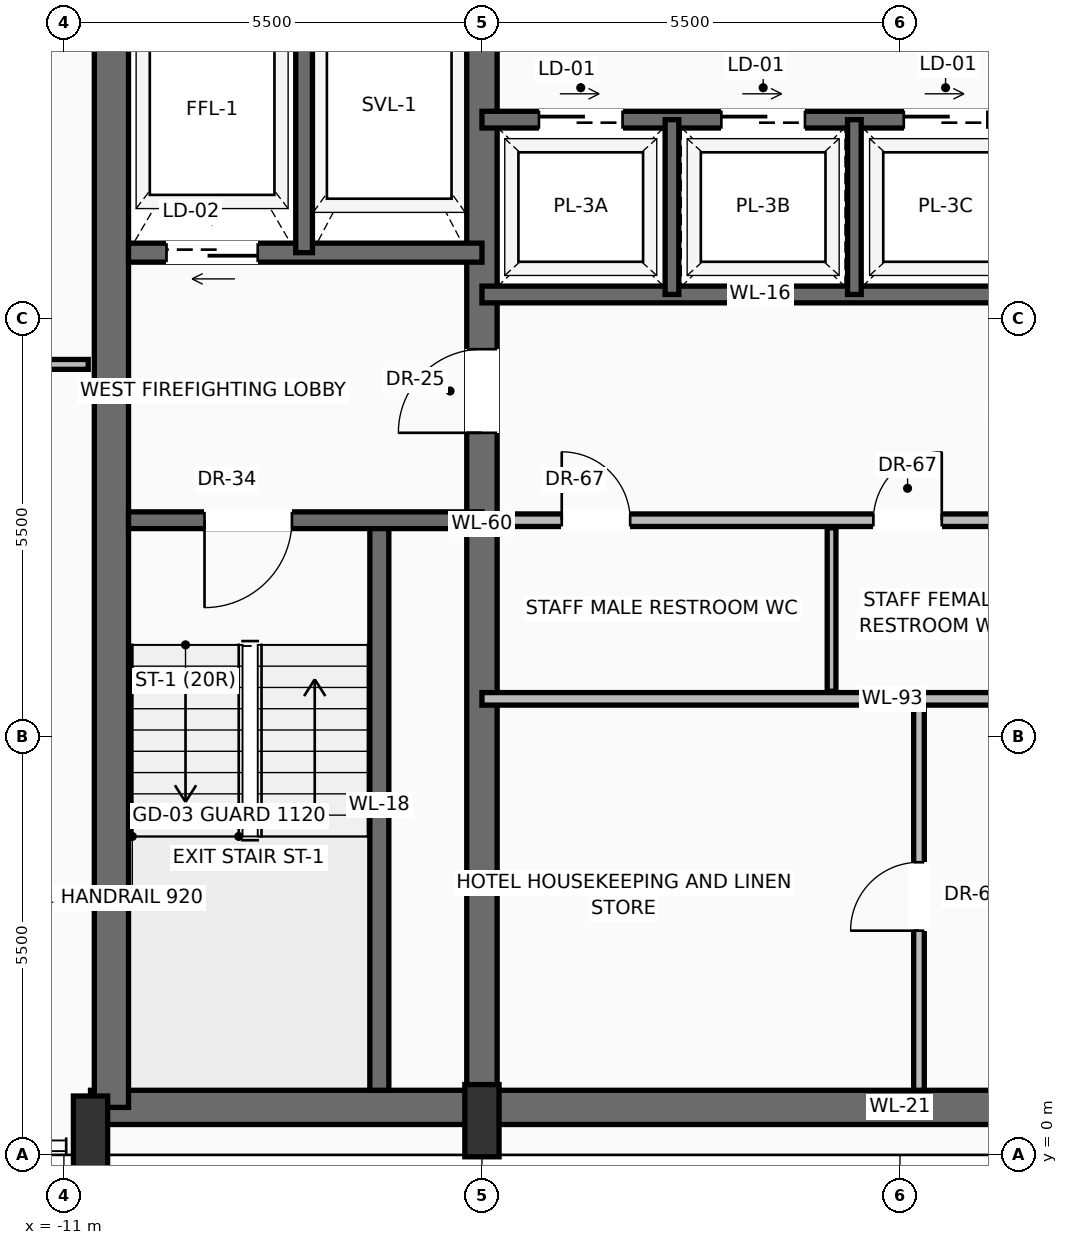
"""IFC4 building model, lengths in metres.
Left out: names, types, materials, properties, quantities, classifications, styles, units other than length and angle.
Written with IfcOpenShell. Run it as: python <this file> out.ifc"""

import sys

from ifc_helpers import new_model, si_unit, direction, frame, frame_2d, origin, origin_2d, place, context, subcontext, project, spatial, rectangle, extrude, source, transform, mapped, element, fill, save


model = new_model("IFC4")
c1 = context("Model", 3, precision=1e-05, world=origin(), true_north=direction((0.0, 1.0)))
c2 = subcontext(c1, "Body", "Model", "MODEL_VIEW")
j1 = project(units=[si_unit("LENGTHUNIT", "METRE"), si_unit("PLANEANGLEUNIT", "RADIAN")], contexts=[c1])
p1 = place(None, origin())
s1 = spatial("IfcSite", under=j1, at=p1, CompositionType="ELEMENT")
p2 = place(p1, origin())
s2 = spatial("IfcBuilding", under=s1, at=p2, CompositionType="ELEMENT")
p3 = place(p2, frame((0.0, 0.0, 273.0)))
s3 = spatial("IfcBuildingStorey", under=s2, at=p3, CompositionType="ELEMENT", Elevation=273.0)
p4 = place(p3, frame((-10.65, 0.625, 0.0), z_axis=(0.0, 0.0, 1.0), x_axis=(1.0, 0.0, 0.0)))
e1 = element("IfcWall", 1, at=p4, inside=s3, PredefinedType="SHEAR", context=c2, shape_type="SweptSolid", body=[
    extrude(rectangle(XDim=21.3, YDim=0.45, at=frame_2d((10.65, 0.0))), origin(), (0.0, 0.0, 1.0), 3.24),
])
p5 = place(p3, frame((-10.375, 0.625, 0.0), z_axis=(0.0, 0.0, 1.0), x_axis=(0.0, 1.0, 0.0)))
e2 = element("IfcWall", 2, at=p5, inside=s3, PredefinedType="SHEAR", context=c2, shape_type="SweptSolid", body=[
    extrude(rectangle(XDim=15.35, YDim=0.45, at=frame_2d((7.675, 0.0))), origin(), (0.0, 0.0, 1.0), 3.24),
])
p6 = place(p3, frame((-5.5, 0.625, 0.0), z_axis=(0.0, 0.0, 1.0), x_axis=(0.0, 1.0, 0.0)))
e3 = element("IfcWall", 3, at=p6, inside=s3, PredefinedType="SHEAR", context=c2, shape_type="SweptSolid", body=[
    extrude(rectangle(XDim=15.35, YDim=0.4, at=frame_2d((7.675, 0.0))), origin(), (0.0, 0.0, 1.0), 3.24),
])
p7 = place(p6, frame((8.875, 0.0, 0.0)))
e4 = element("IfcOpeningElement", 4, at=p7, cuts=e3, PredefinedType="OPENING", context=c2, shape_type="SweptSolid", body=[
    extrude(rectangle(XDim=1.1, YDim=2.2, at=frame_2d((0.55, 1.1))), frame((0.0, 0.21, 0.0), z_axis=(0.0, -1.0, 0.0), x_axis=(1.0, 0.0, 0.0)), (0.0, 0.0, 1.0), 0.42),
])
m1 = source(origin(), c2, "Body", "SweptSolid", [
    extrude(rectangle(XDim=0.45, YDim=0.95, at=origin_2d()), origin(), (0.0, 0.0, 1.0), 3.45),
])
for number, where, z_axis, x_axis in (
    (5, (-10.65, 0.3, 0.0), (0.0, 0.0, 1.0), (1.0, 0.0, 0.0)),
    (6, (-5.5, 0.45, 0.0), (0.0, 0.0, 1.0), (1.0, 0.0, 0.0)),
):
    element("IfcColumn", number, at=place(p3, frame(where, z_axis=z_axis, x_axis=x_axis)), inside=s3, PredefinedType="PILASTER", context=c2, shape_type="MappedRepresentation", body=[
        mapped(m1, transform((0.0, 0.0, 0.0), scale=1.0)),
    ])
p8 = place(p3, frame((-18.529, 14.308, 0.0), z_axis=(0.0, 0.0, 1.0), x_axis=(0.500615740451, 0.86566961389, 0.0)))
e7 = element("IfcWall", 7, at=p8, inside=s3, PredefinedType="SOLIDWALL", context=c2, shape_type="SweptSolid", body=[
    extrude(rectangle(XDim=20.05, YDim=0.28, at=frame_2d((10.025, 0.0))), origin(), (0.0, 0.0, 1.0), 2.82),
])
p9 = place(p8, frame((4.812, 0.0, 0.0)))
e8 = element("IfcOpeningElement", 8, at=p9, cuts=e7, PredefinedType="OPENING", context=c2, shape_type="SweptSolid", body=[
    extrude(rectangle(XDim=1.6, YDim=2.35, at=frame_2d((0.8, 1.175))), frame((0.0, 0.15, 0.0), z_axis=(0.0, -1.0, 0.0), x_axis=(1.0, 0.0, 0.0)), (0.0, 0.0, 1.0), 0.3),
])
p10 = place(p8, frame((13.634, 0.0, 0.9)))
e9 = element("IfcOpeningElement", 9, at=p10, cuts=e7, PredefinedType="OPENING", context=c2, shape_type="SweptSolid", body=[
    extrude(rectangle(XDim=1.55, YDim=1.75, at=frame_2d((0.775, 0.875))), frame((0.0, 0.15, 0.0), z_axis=(0.0, -1.0, 0.0), x_axis=(1.0, 0.0, 0.0)), (0.0, 0.0, 1.0), 0.3),
])
p11 = place(p3, frame((-6.85, 0.85, 0.0), z_axis=(0.0, 0.0, 1.0), x_axis=(0.0, 1.0, 0.0)))
e10 = element("IfcWall", 10, at=p11, inside=s3, PredefinedType="SOLIDWALL", context=c2, shape_type="SweptSolid", body=[
    extrude(rectangle(XDim=7.5, YDim=0.25, at=frame_2d((3.75, 0.0))), origin(), (0.0, 0.0, 1.0), 3.24),
])
p12 = place(p3, frame((-5.5, 8.35, 0.0), z_axis=(0.0, 0.0, 1.0), x_axis=(-1.0, 0.0, 0.0)))
e11 = element("IfcWall", 11, at=p12, inside=s3, PredefinedType="SOLIDWALL", context=c2, shape_type="SweptSolid", body=[
    extrude(rectangle(XDim=4.65, YDim=0.22, at=frame_2d((2.325, 0.0))), origin(), (0.0, 0.0, 1.0), 3.24),
])
p13 = place(p12, frame((2.5, 0.0, 0.0)))
e12 = element("IfcOpeningElement", 12, at=p13, cuts=e11, PredefinedType="OPENING", context=c2, shape_type="SweptSolid", body=[
    extrude(rectangle(XDim=1.15, YDim=2.2, at=frame_2d((0.575, 1.1))), frame((0.0, 0.12, 0.0), z_axis=(0.0, -1.0, 0.0), x_axis=(1.0, 0.0, 0.0)), (0.0, 0.0, 1.0), 0.24),
])
p14 = place(p3, frame((-5.5, 11.87, 0.0), z_axis=(0.0, 0.0, 1.0), x_axis=(-1.0, 0.0, 0.0)))
e13 = element("IfcWall", 13, at=p14, inside=s3, PredefinedType="SOLIDWALL", context=c2, shape_type="SweptSolid", body=[
    extrude(rectangle(XDim=4.65, YDim=0.25, at=frame_2d((2.325, 0.0))), origin(), (0.0, 0.0, 1.0), 3.24),
])
p15 = place(p14, frame((2.95, 0.0, 0.0)))
e14 = element("IfcOpeningElement", 14, at=p15, cuts=e13, PredefinedType="OPENING", context=c2, shape_type="SweptSolid", body=[
    extrude(rectangle(XDim=1.2, YDim=2.25, at=frame_2d((0.6, 1.125))), frame((0.0, 0.135, 0.0), z_axis=(0.0, -1.0, 0.0), x_axis=(1.0, 0.0, 0.0)), (0.0, 0.0, 1.0), 0.27),
])
p16 = place(p3, frame((-7.84, 11.87, 0.0), z_axis=(0.0, 0.0, 1.0), x_axis=(0.0, 1.0, 0.0)))
e15 = element("IfcWall", 15, at=p16, inside=s3, PredefinedType="SOLIDWALL", context=c2, shape_type="SweptSolid", body=[
    extrude(rectangle(XDim=3.88, YDim=0.22, at=frame_2d((1.94, 0.0))), origin(), (0.0, 0.0, 1.0), 3.24),
])
p17 = place(p3, frame((-5.5, 6.0, 0.0), z_axis=(0.0, 0.0, 1.0), x_axis=(1.0, 0.0, 0.0)))
e16 = element("IfcWall", 16, at=p17, inside=s3, PredefinedType="PARTITIONING", context=c2, shape_type="SweptSolid", body=[
    extrude(rectangle(XDim=10.8, YDim=0.165, at=frame_2d((5.4, 0.0))), origin(), (0.0, 0.0, 1.0), 3.232),
])
p18 = place(p17, frame((7.7, 0.0, 0.0)))
e17 = element("IfcOpeningElement", 17, at=p18, cuts=e16, PredefinedType="OPENING", context=c2, shape_type="SweptSolid", body=[
    extrude(rectangle(XDim=0.9, YDim=2.1, at=frame_2d((0.45, 1.05))), frame((0.0, 0.093, 0.0), z_axis=(0.0, -1.0, 0.0), x_axis=(1.0, 0.0, 0.0)), (0.0, 0.0, 1.0), 0.185),
])
p19 = place(p3, frame((0.25, 0.85, 0.0), z_axis=(0.0, 0.0, 1.0), x_axis=(0.0, 1.0, 0.0)))
e18 = element("IfcWall", 18, at=p19, inside=s3, PredefinedType="PARTITIONING", context=c2, shape_type="SweptSolid", body=[
    extrude(rectangle(XDim=5.03, YDim=0.14, at=frame_2d((2.515, 0.0))), origin(), (0.0, 0.0, 1.0), 3.232),
])
p20 = place(p19, frame((2.1, 0.0, 0.0)))
e19 = element("IfcOpeningElement", 19, at=p20, cuts=e18, PredefinedType="OPENING", context=c2, shape_type="SweptSolid", body=[
    extrude(rectangle(XDim=0.9, YDim=2.1, at=frame_2d((0.45, 1.05))), frame((0.0, 0.08, 0.0), z_axis=(0.0, -1.0, 0.0), x_axis=(1.0, 0.0, 0.0)), (0.0, 0.0, 1.0), 0.16),
])
p21 = place(p3, frame((-5.3, 8.35, 0.0), z_axis=(0.0, 0.0, 1.0), x_axis=(1.0, 0.0, 0.0)))
e20 = element("IfcWall", 20, at=p21, inside=s3, PredefinedType="PARTITIONING", context=c2, shape_type="SweptSolid", body=[
    extrude(rectangle(XDim=7.12, YDim=0.165, at=frame_2d((3.56, 0.0))), origin(), (0.0, 0.0, 1.0), 3.232),
])
p22 = place(p21, frame((0.85, 0.0, 0.0)))
e21 = element("IfcOpeningElement", 21, at=p22, cuts=e20, PredefinedType="OPENING", context=c2, shape_type="SweptSolid", body=[
    extrude(rectangle(XDim=0.9, YDim=2.1, at=frame_2d((0.45, 1.05))), frame((0.0, 0.093, 0.0), z_axis=(0.0, -1.0, 0.0), x_axis=(1.0, 0.0, 0.0)), (0.0, 0.0, 1.0), 0.185),
])
p23 = place(p21, frame((4.95, 0.0, 0.0)))
e22 = element("IfcOpeningElement", 22, at=p23, cuts=e20, PredefinedType="OPENING", context=c2, shape_type="SweptSolid", body=[
    extrude(rectangle(XDim=0.9, YDim=2.1, at=frame_2d((0.45, 1.05))), frame((0.0, 0.093, 0.0), z_axis=(0.0, -1.0, 0.0), x_axis=(1.0, 0.0, 0.0)), (0.0, 0.0, 1.0), 0.185),
])
p24 = place(p3, frame((-0.9, 6.1, 0.0), z_axis=(0.0, 0.0, 1.0), x_axis=(0.0, 1.0, 0.0)))
e23 = element("IfcWall", 23, at=p24, inside=s3, PredefinedType="PARTITIONING", context=c2, shape_type="SweptSolid", body=[
    extrude(rectangle(XDim=2.15, YDim=0.115, at=frame_2d((1.075, 0.0))), origin(), (0.0, 0.0, 1.0), 3.232),
])
p25 = place(p3, frame((-5.5, 11.32, 0.0), z_axis=(0.0, 0.0, 1.0), x_axis=(1.0, 0.0, 0.0)))
e24 = element("IfcWall", 24, at=p25, inside=s3, PredefinedType="SOLIDWALL", context=c2, shape_type="SweptSolid", body=[
    extrude(rectangle(XDim=7.32, YDim=0.22, at=frame_2d((3.66, 0.0))), origin(), (0.0, 0.0, 1.0), 3.24),
])
p26 = place(p3, frame((-5.5, 13.62, 0.0), z_axis=(0.0, 0.0, 1.0), x_axis=(1.0, 0.0, 0.0)))
e25 = element("IfcWall", 25, at=p26, inside=s3, PredefinedType="SOLIDWALL", context=c2, shape_type="SweptSolid", body=[
    extrude(rectangle(XDim=7.32, YDim=0.22, at=frame_2d((3.66, 0.0))), origin(), (0.0, 0.0, 1.0), 3.24),
])
p27 = place(p26, frame((0.75, 0.0, 0.0)))
e26 = element("IfcOpeningElement", 26, at=p27, cuts=e25, PredefinedType="OPENING", context=c2, shape_type="SweptSolid", body=[
    extrude(rectangle(XDim=1.1, YDim=2.2, at=frame_2d((0.55, 1.1))), frame((0.0, 0.12, 0.0), z_axis=(0.0, -1.0, 0.0), x_axis=(1.0, 0.0, 0.0)), (0.0, 0.0, 1.0), 0.24),
])
p28 = place(p26, frame((3.15, 0.0, 0.0)))
e27 = element("IfcOpeningElement", 27, at=p28, cuts=e25, PredefinedType="OPENING", context=c2, shape_type="SweptSolid", body=[
    extrude(rectangle(XDim=1.1, YDim=2.2, at=frame_2d((0.55, 1.1))), frame((0.0, 0.12, 0.0), z_axis=(0.0, -1.0, 0.0), x_axis=(1.0, 0.0, 0.0)), (0.0, 0.0, 1.0), 0.24),
])
p29 = place(p26, frame((5.55, 0.0, 0.0)))
e28 = element("IfcOpeningElement", 28, at=p29, cuts=e25, PredefinedType="OPENING", context=c2, shape_type="SweptSolid", body=[
    extrude(rectangle(XDim=1.1, YDim=2.2, at=frame_2d((0.55, 1.1))), frame((0.0, 0.12, 0.0), z_axis=(0.0, -1.0, 0.0), x_axis=(1.0, 0.0, 0.0)), (0.0, 0.0, 1.0), 0.24),
])
for number, where, z_axis, x_axis in (
    (29, (-3.0, 11.32, 0.0), (0.0, 0.0, 1.0), (0.0, 1.0, 0.0)),
    (30, (-0.6, 11.32, 0.0), (0.0, 0.0, 1.0), (0.0, 1.0, 0.0)),
):
    element("IfcWall", number, at=place(p3, frame(where, z_axis=z_axis, x_axis=x_axis)), inside=s3, PredefinedType="SOLIDWALL", context=c2, shape_type="SweptSolid", body=[
        extrude(rectangle(XDim=2.3, YDim=0.18, at=frame_2d((1.15, 0.0))), origin(), (0.0, 0.0, 1.0), 3.24),
    ])
p30 = place(p3, frame((-20.938, 10.4, 0.0), z_axis=(0.0, 0.0, 1.0), x_axis=(1.0, 0.0, 0.0)))
e31 = element("IfcWall", 31, at=p30, inside=s3, PredefinedType="PARTITIONING", context=c2, shape_type="SweptSolid", body=[
    extrude(rectangle(XDim=10.259, YDim=0.13, at=frame_2d((5.129, 0.0))), origin(), (0.0, 0.0, 1.0), 3.232),
])
p31 = place(p30, frame((4.175, 0.0, 0.0)))
e32 = element("IfcOpeningElement", 32, at=p31, cuts=e31, PredefinedType="OPENING", context=c2, shape_type="SweptSolid", body=[
    extrude(rectangle(XDim=0.95, YDim=2.2, at=frame_2d((0.475, 1.1))), frame((0.0, 0.075, 0.0), z_axis=(0.0, -1.0, 0.0), x_axis=(1.0, 0.0, 0.0)), (0.0, 0.0, 1.0), 0.15),
])
m2 = source(origin(), c2, "Body", "SweptSolid", [
    extrude(rectangle(XDim=1.15, YDim=2.2, at=frame_2d((0.575, 1.1))), frame((0.0, 0.025, 0.0), z_axis=(0.0, -1.0, 0.0), x_axis=(1.0, 0.0, 0.0)), (0.0, 0.0, 1.0), 0.05),
])
p32 = place(p13, origin())
e33 = element("IfcDoor", 33, at=p32, inside=s3, OperationType="SINGLE_SWING_RIGHT", PredefinedType="DOOR", context=c2, shape_type="MappedRepresentation", body=[
    mapped(m2, transform((0.0, 0.0, 0.0), scale=1.0)),
])
fill(e12, e33)
m3 = source(origin(), c2, "Body", "SweptSolid", [
    extrude(rectangle(XDim=1.1, YDim=2.2, at=frame_2d((0.55, 1.1))), frame((0.0, 0.025, 0.0), z_axis=(0.0, -1.0, 0.0), x_axis=(1.0, 0.0, 0.0)), (0.0, 0.0, 1.0), 0.05),
])
p33 = place(p7, origin())
e34 = element("IfcDoor", 34, at=p33, inside=s3, OperationType="SINGLE_SWING_LEFT", PredefinedType="DOOR", context=c2, shape_type="MappedRepresentation", body=[
    mapped(m3, transform((0.0, 0.0, 0.0), scale=1.0)),
])
fill(e4, e34)
m4 = source(origin(), c2, "Body", "SweptSolid", [
    extrude(rectangle(XDim=1.2, YDim=2.25, at=frame_2d((0.6, 1.125))), frame((0.0, 0.025, 0.0), z_axis=(0.0, -1.0, 0.0), x_axis=(1.0, 0.0, 0.0)), (0.0, 0.0, 1.0), 0.05),
])
p34 = place(p15, origin())
e35 = element("IfcDoor", 35, at=p34, inside=s3, OperationType="SLIDING_TO_LEFT", PredefinedType="DOOR", context=c2, shape_type="MappedRepresentation", body=[
    mapped(m4, transform((0.0, 0.0, 0.0), scale=1.0)),
])
fill(e14, e35)
m5 = source(origin(), c2, "Body", "SweptSolid", [
    extrude(rectangle(XDim=0.9, YDim=2.1, at=frame_2d((0.45, 1.05))), frame((0.0, 0.025, 0.0), z_axis=(0.0, -1.0, 0.0), x_axis=(1.0, 0.0, 0.0)), (0.0, 0.0, 1.0), 0.05),
])
p35 = place(p20, origin())
e36 = element("IfcDoor", 36, at=p35, inside=s3, OperationType="SINGLE_SWING_LEFT", PredefinedType="DOOR", context=c2, shape_type="MappedRepresentation", body=[
    mapped(m5, transform((0.0, 0.0, 0.0), scale=1.0)),
])
fill(e19, e36)
p36 = place(p22, origin())
e37 = element("IfcDoor", 37, at=p36, inside=s3, OperationType="SINGLE_SWING_LEFT", PredefinedType="DOOR", context=c2, shape_type="MappedRepresentation", body=[
    mapped(m5, transform((0.0, 0.0, 0.0), scale=1.0)),
])
fill(e21, e37)
p37 = place(p23, origin())
e38 = element("IfcDoor", 38, at=p37, inside=s3, OperationType="SINGLE_SWING_RIGHT", PredefinedType="DOOR", context=c2, shape_type="MappedRepresentation", body=[
    mapped(m5, transform((0.0, 0.0, 0.0), scale=1.0)),
])
fill(e22, e38)
m6 = source(origin(), c2, "Body", "SweptSolid", [
    extrude(rectangle(XDim=1.1, YDim=2.2, at=frame_2d((0.55, 1.1))), frame((0.0, 0.025, 0.0), z_axis=(0.0, -1.0, 0.0), x_axis=(1.0, 0.0, 0.0)), (0.0, 0.0, 1.0), 0.05),
])
p38 = place(p27, origin())
e39 = element("IfcDoor", 39, at=p38, inside=s3, OperationType="SLIDING_TO_RIGHT", PredefinedType="DOOR", context=c2, shape_type="MappedRepresentation", body=[
    mapped(m6, transform((0.0, 0.0, 0.0), scale=1.0)),
])
fill(e26, e39)
p39 = place(p28, origin())
e40 = element("IfcDoor", 40, at=p39, inside=s3, OperationType="SLIDING_TO_RIGHT", PredefinedType="DOOR", context=c2, shape_type="MappedRepresentation", body=[
    mapped(m6, transform((0.0, 0.0, 0.0), scale=1.0)),
])
fill(e27, e40)
p40 = place(p29, origin())
e41 = element("IfcDoor", 41, at=p40, inside=s3, OperationType="SLIDING_TO_RIGHT", PredefinedType="DOOR", context=c2, shape_type="MappedRepresentation", body=[
    mapped(m6, transform((0.0, 0.0, 0.0), scale=1.0)),
])
fill(e28, e41)
save(model, sys.argv[1])
